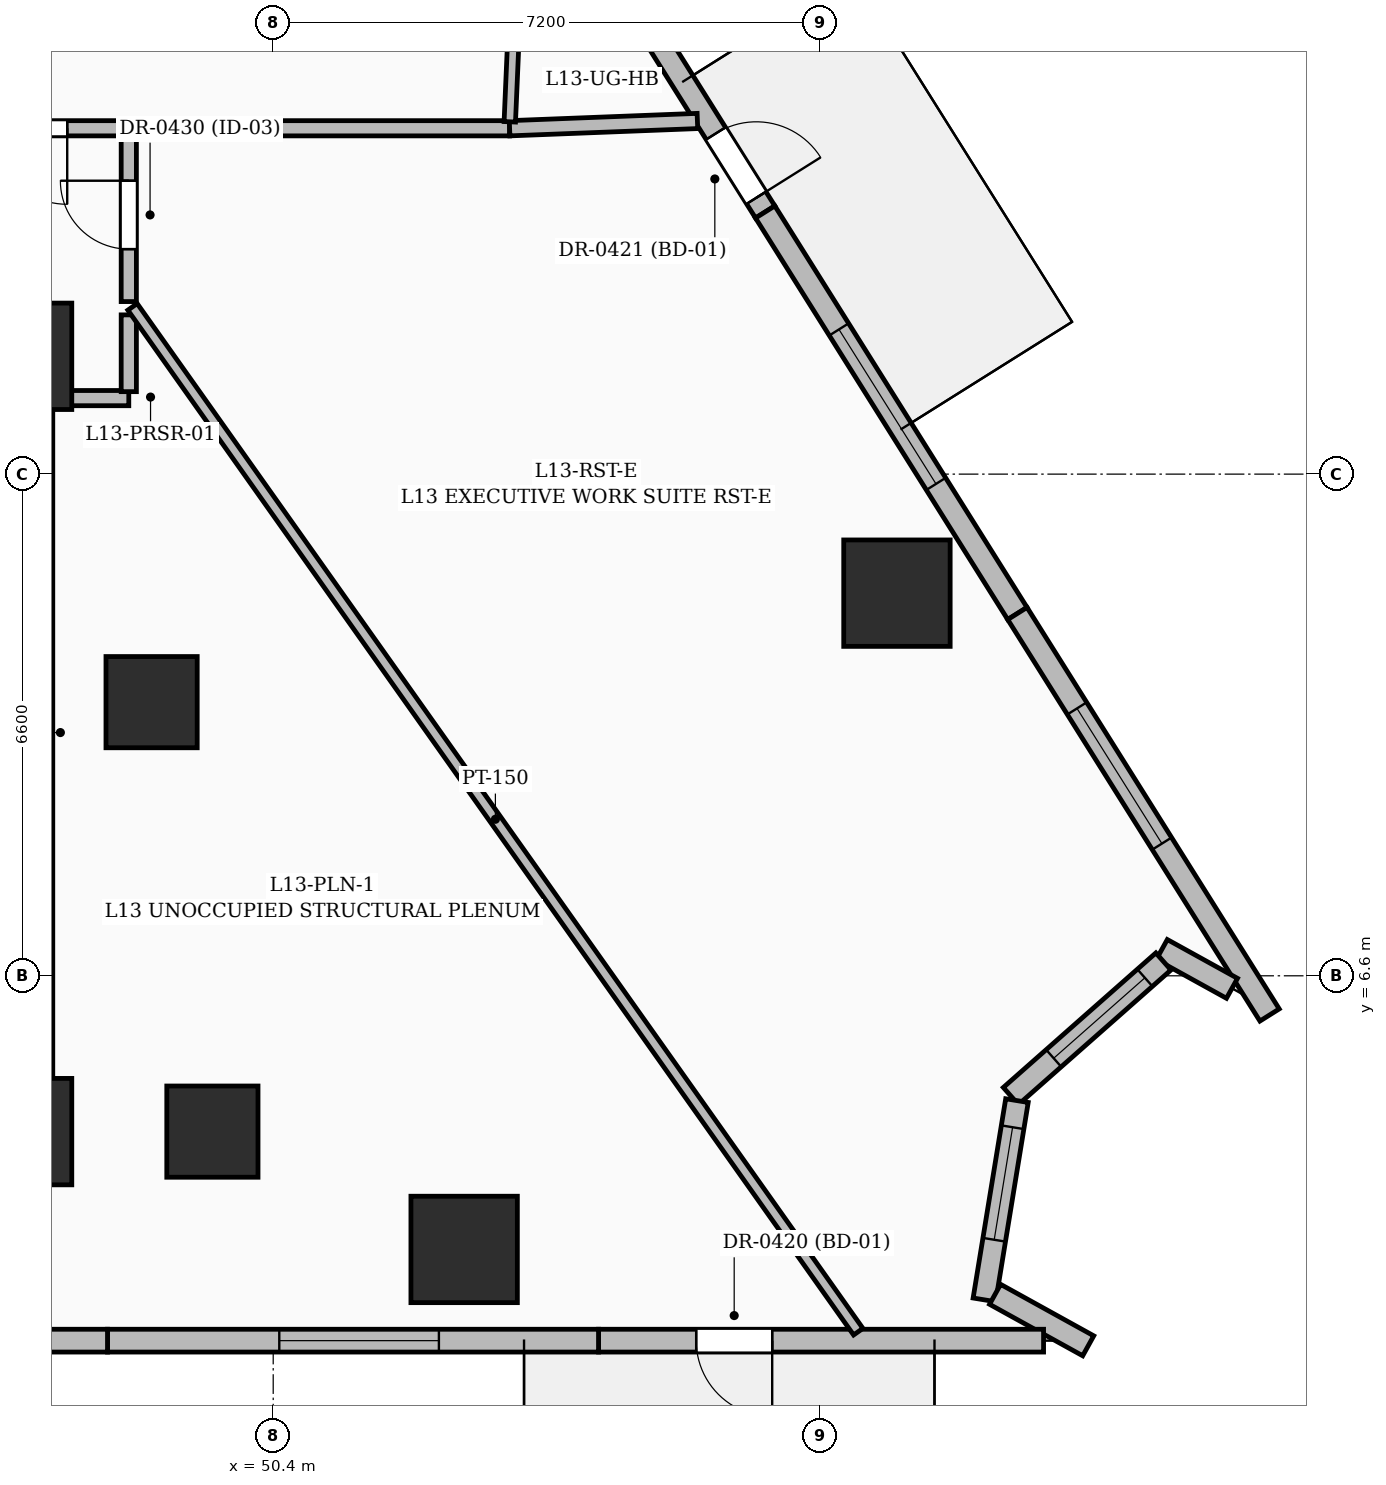
"""IFC4 building model, lengths in metres.
Left out: names, types, materials, properties, quantities, classifications, styles, units other than length and angle.
Written with IfcOpenShell. Run it as: python <this file> out.ifc"""

import sys

from ifc_helpers import new_model, si_unit, direction, frame, frame_2d, origin, origin_2d, place, context, subcontext, project, spatial, rectangle, extrude, element, fill, save


model = new_model("IFC4")
c1 = context("Model", 3, precision=1e-05, world=origin(), true_north=direction((0.0, 1.0)))
c2 = subcontext(c1, "Body", "Model", "MODEL_VIEW")
j1 = project(units=[si_unit("LENGTHUNIT", "METRE"), si_unit("PLANEANGLEUNIT", "RADIAN")], contexts=[c1])
p1 = place(None, origin())
s1 = spatial("IfcSite", under=j1, at=p1, CompositionType="ELEMENT")
p2 = place(p1, origin())
s2 = spatial("IfcBuilding", under=s1, at=p2, CompositionType="ELEMENT")
p3 = place(p2, frame((0.0, 0.0, 57.0)))
s3 = spatial("IfcBuildingStorey", under=s2, at=p3, CompositionType="ELEMENT", Elevation=57.0)
for number, where, z_axis, x_axis in (
    (1, (47.05, 4.55, 0.0), (0.0, 0.0, 1.0), (1.0, 0.0, 0.0)),
    (2, (47.05, 14.75, 0.0), (0.0, 0.0, 1.0), (1.0, 0.0, 0.0)),
):
    element("IfcColumn", number, at=place(p3, frame(where, z_axis=z_axis, x_axis=x_axis)), inside=s3, PredefinedType="COLUMN", context=c2, shape_type="SweptSolid", body=[
        extrude(rectangle(XDim=1.4, YDim=1.4, at=origin_2d()), origin(), (0.0, 0.0, 1.0), 3.6),
    ])
for number, where, z_axis, x_axis in (
    (3, (49.6, 4.55, 0.0), (0.0, 0.0, 1.0), (1.0, 0.0, 0.0)),
    (4, (48.8, 10.2, 0.0), (0.0, 0.0, 1.0), (1.0, 0.0, 0.0)),
):
    element("IfcColumn", number, at=place(p3, frame(where, z_axis=z_axis, x_axis=x_axis)), inside=s3, PredefinedType="COLUMN", context=c2, shape_type="SweptSolid", body=[
        extrude(rectangle(XDim=1.2, YDim=1.2, at=origin_2d()), origin(), (0.0, 0.0, 1.0), 3.6),
    ])
for number, where, z_axis, x_axis in (
    (5, (52.912, 3.0, 0.0), (0.0, 0.0, 1.0), (1.0, 0.0, 0.0)),
    (6, (58.606, 11.634, 0.0), (0.0, 0.0, 1.0), (1.0, 0.0, 0.0)),
):
    element("IfcColumn", number, at=place(p3, frame(where, z_axis=z_axis, x_axis=x_axis)), inside=s3, PredefinedType="COLUMN", context=c2, shape_type="SweptSolid", body=[
        extrude(rectangle(XDim=1.4, YDim=1.4, at=origin_2d()), origin(), (0.0, 0.0, 1.0), 3.6),
    ])
p4 = place(p3, frame((53.616, 21.834, 0.0), z_axis=(0.0, 0.0, 1.0), x_axis=(0.531897146978, -0.846808966082, 0.0)))
e7 = element("IfcWall", 7, at=p4, inside=s3, PredefinedType="SOLIDWALL", context=c2, shape_type="SweptSolid", body=[
    extrude(rectangle(XDim=6.123, YDim=0.3, at=frame_2d((3.062, 0.0))), origin(), (0.0, 0.0, 1.0), 3.35),
])
p5 = place(p4, frame((4.903, 0.0, 0.0)))
e8 = element("IfcOpeningElement", 8, at=p5, cuts=e7, PredefinedType="OPENING", context=c2, shape_type="SweptSolid", body=[
    extrude(rectangle(XDim=1.0, YDim=2.2, at=frame_2d((0.5, 1.1))), frame((0.0, 0.16, 0.0), z_axis=(0.0, -1.0, 0.0), x_axis=(1.0, 0.0, 0.0)), (0.0, 0.0, 1.0), 0.32),
])
p6 = place(p3, frame((56.873, 16.649, 0.0), z_axis=(0.0, 0.0, 1.0), x_axis=(0.531897384848, -0.846808816671, 0.0)))
e9 = element("IfcWall", 9, at=p6, inside=s3, PredefinedType="SOLIDWALL", context=c2, shape_type="SweptSolid", body=[
    extrude(rectangle(XDim=6.238, YDim=0.3, at=frame_2d((3.119, 0.0))), origin(), (0.0, 0.0, 1.0), 3.35),
])
p7 = place(p6, frame((1.825, 0.0, 0.6)))
e10 = element("IfcOpeningElement", 10, at=p7, cuts=e9, PredefinedType="OPENING", context=c2, shape_type="SweptSolid", body=[
    extrude(rectangle(XDim=2.4, YDim=2.1, at=frame_2d((1.2, 1.05))), frame((0.0, 0.16, 0.0), z_axis=(0.0, -1.0, 0.0), x_axis=(1.0, 0.0, 0.0)), (0.0, 0.0, 1.0), 0.32),
])
p8 = place(p3, frame((60.19, 11.367, 0.0), z_axis=(0.0, 0.0, 1.0), x_axis=(0.531925449882, -0.846791187819, 0.0)))
e11 = element("IfcWall", 11, at=p8, inside=s3, PredefinedType="SOLIDWALL", context=c2, shape_type="SweptSolid", body=[
    extrude(rectangle(XDim=6.238, YDim=0.3, at=frame_2d((3.119, 0.0))), origin(), (0.0, 0.0, 1.0), 3.35),
])
p9 = place(p8, frame((1.475, 0.0, 0.55)))
e12 = element("IfcOpeningElement", 12, at=p9, cuts=e11, PredefinedType="OPENING", context=c2, shape_type="SweptSolid", body=[
    extrude(rectangle(XDim=2.1, YDim=2.4, at=frame_2d((1.05, 1.2))), frame((0.0, 0.16, 0.0), z_axis=(0.0, -1.0, 0.0), x_axis=(1.0, 0.0, 0.0)), (0.0, 0.0, 1.0), 0.32),
])
p10 = place(p3, frame((63.014, 6.435, 0.0), z_axis=(0.0, 0.0, 1.0), x_axis=(-0.875148714457, 0.483854035412, 0.0)))
e13 = element("IfcWall", 13, at=p10, inside=s3, PredefinedType="SOLIDWALL", context=c2, shape_type="SweptSolid", body=[
    extrude(rectangle(XDim=1.055, YDim=0.3, at=frame_2d((0.528, 0.0))), origin(), (0.0, 0.0, 1.0), 3.35),
])
p11 = place(p3, frame((62.112, 6.789, 0.0), z_axis=(0.0, 0.0, 1.0), x_axis=(-0.749880449764, -0.661573360303, 0.0)))
e14 = element("IfcWall", 14, at=p11, inside=s3, PredefinedType="SOLIDWALL", context=c2, shape_type="SweptSolid", body=[
    extrude(rectangle(XDim=2.676, YDim=0.3, at=frame_2d((1.338, 0.0))), origin(), (0.0, 0.0, 1.0), 3.35),
])
p12 = place(p11, frame((0.325, 0.0, 0.55)))
e15 = element("IfcOpeningElement", 15, at=p12, cuts=e14, PredefinedType="OPENING", context=c2, shape_type="SweptSolid", body=[
    extrude(rectangle(XDim=1.6, YDim=2.2, at=frame_2d((0.8, 1.1))), frame((0.0, 0.16, 0.0), z_axis=(0.0, -1.0, 0.0), x_axis=(1.0, 0.0, 0.0)), (0.0, 0.0, 1.0), 0.32),
])
p13 = place(p3, frame((60.185, 4.958, 0.0), z_axis=(0.0, 0.0, 1.0), x_axis=(-0.16141694699, -0.986886300049, 0.0)))
e16 = element("IfcWall", 16, at=p13, inside=s3, PredefinedType="SOLIDWALL", context=c2, shape_type="SweptSolid", body=[
    extrude(rectangle(XDim=2.656, YDim=0.3, at=frame_2d((1.328, 0.0))), origin(), (0.0, 0.0, 1.0), 3.35),
])
p14 = place(p13, frame((0.355, 0.0, 0.6)))
e17 = element("IfcOpeningElement", 17, at=p14, cuts=e16, PredefinedType="OPENING", context=c2, shape_type="SweptSolid", body=[
    extrude(rectangle(XDim=1.5, YDim=2.1, at=frame_2d((0.75, 1.05))), frame((0.0, 0.16, 0.0), z_axis=(0.0, -1.0, 0.0), x_axis=(1.0, 0.0, 0.0)), (0.0, 0.0, 1.0), 0.32),
])
p15 = place(p3, frame((59.897, 2.41, 0.0), z_axis=(0.0, 0.0, 1.0), x_axis=(0.875216279123, -0.483731810777, 0.0)))
e18 = element("IfcWall", 18, at=p15, inside=s3, PredefinedType="SOLIDWALL", context=c2, shape_type="SweptSolid", body=[
    extrude(rectangle(XDim=1.4, YDim=0.3, at=frame_2d((0.7, 0.0))), origin(), (0.0, 0.0, 1.0), 3.35),
])
p16 = place(p3, frame((60.535, 1.8, 0.0), z_axis=(0.0, 0.0, 1.0), x_axis=(-1.0, 0.0, 0.0)))
e19 = element("IfcWall", 19, at=p16, inside=s3, PredefinedType="SOLIDWALL", context=c2, shape_type="SweptSolid", body=[
    extrude(rectangle(XDim=5.855, YDim=0.3, at=frame_2d((2.927, 0.0))), origin(), (0.0, 0.0, 1.0), 3.35),
])
p17 = place(p16, frame((3.57, 0.0, 0.0)))
e20 = element("IfcOpeningElement", 20, at=p17, cuts=e19, PredefinedType="OPENING", context=c2, shape_type="SweptSolid", body=[
    extrude(rectangle(XDim=1.0, YDim=2.2, at=frame_2d((0.5, 1.1))), frame((0.0, 0.16, 0.0), z_axis=(0.0, -1.0, 0.0), x_axis=(1.0, 0.0, 0.0)), (0.0, 0.0, 1.0), 0.32),
])
p18 = place(p3, frame((54.68, 1.8, 0.0), z_axis=(0.0, 0.0, 1.0), x_axis=(-1.0, 0.0, 0.0)))
e21 = element("IfcWall", 21, at=p18, inside=s3, PredefinedType="SOLIDWALL", context=c2, shape_type="SweptSolid", body=[
    extrude(rectangle(XDim=6.46, YDim=0.3, at=frame_2d((3.23, 0.0))), origin(), (0.0, 0.0, 1.0), 3.35),
])
p19 = place(p18, frame((2.1, 0.0, 0.55)))
e22 = element("IfcOpeningElement", 22, at=p19, cuts=e21, PredefinedType="OPENING", context=c2, shape_type="SweptSolid", body=[
    extrude(rectangle(XDim=2.1, YDim=2.4, at=frame_2d((1.05, 1.2))), frame((0.0, 0.16, 0.0), z_axis=(0.0, -1.0, 0.0), x_axis=(1.0, 0.0, 0.0)), (0.0, 0.0, 1.0), 0.32),
])
p20 = place(p3, frame((48.22, 1.8, 0.0), z_axis=(0.0, 0.0, 1.0), x_axis=(-1.0, 0.0, 0.0)))
e23 = element("IfcWall", 23, at=p20, inside=s3, PredefinedType="SOLIDWALL", context=c2, shape_type="SweptSolid", body=[
    extrude(rectangle(XDim=6.46, YDim=0.3, at=frame_2d((3.23, 0.0))), origin(), (0.0, 0.0, 1.0), 3.35),
])
p21 = place(p20, frame((2.25, 0.0, 0.6)))
e24 = element("IfcOpeningElement", 24, at=p21, cuts=e23, PredefinedType="OPENING", context=c2, shape_type="SweptSolid", body=[
    extrude(rectangle(XDim=1.8, YDim=2.1, at=frame_2d((0.9, 1.05))), frame((0.0, 0.16, 0.0), z_axis=(0.0, -1.0, 0.0), x_axis=(1.0, 0.0, 0.0)), (0.0, 0.0, 1.0), 0.32),
])
p22 = place(p3, frame((47.5, 14.2, 0.0), z_axis=(0.0, 0.0, 1.0), x_axis=(1.0, 0.0, 0.0)))
e25 = element("IfcWall", 25, at=p22, inside=s3, PredefinedType="PARTITIONING", context=c2, shape_type="SweptSolid", body=[
    extrude(rectangle(XDim=1.0, YDim=0.2, at=frame_2d((0.5, 0.0))), origin(), (0.0, 0.0, 1.0), 3.35),
])
p23 = place(p3, frame((48.5, 14.285, 0.0), z_axis=(0.0, 0.0, 1.0), x_axis=(0.0, 1.0, 0.0)))
e26 = element("IfcWall", 26, at=p23, inside=s3, PredefinedType="PARTITIONING", context=c2, shape_type="SweptSolid", body=[
    extrude(rectangle(XDim=1.01, YDim=0.2, at=frame_2d((0.505, 0.0))), origin(), (0.0, 0.0, 1.0), 3.35),
])
p24 = place(p3, frame((48.5, 15.47, 0.0), z_axis=(0.0, 0.0, 1.0), x_axis=(0.0, 1.0, 0.0)))
e27 = element("IfcWall", 27, at=p24, inside=s3, PredefinedType="PARTITIONING", context=c2, shape_type="SweptSolid", body=[
    extrude(rectangle(XDim=2.28, YDim=0.2, at=frame_2d((1.14, 0.0))), origin(), (0.0, 0.0, 1.0), 2.279),
])
p25 = place(p24, frame((0.69, 0.0, 0.0)))
e28 = element("IfcOpeningElement", 28, at=p25, cuts=e27, PredefinedType="OPENING", context=c2, shape_type="SweptSolid", body=[
    extrude(rectangle(XDim=0.9, YDim=2.1, at=frame_2d((0.45, 1.05))), frame((0.0, 0.11, 0.0), z_axis=(0.0, -1.0, 0.0), x_axis=(1.0, 0.0, 0.0)), (0.0, 0.0, 1.0), 0.22),
])
p26 = place(p3, frame((48.415, 17.75, 0.0), z_axis=(0.0, 0.0, 1.0), x_axis=(-1.0, 0.0, 0.0)))
e29 = element("IfcWall", 29, at=p26, inside=s3, PredefinedType="PARTITIONING", context=c2, shape_type="SweptSolid", body=[
    extrude(rectangle(XDim=2.535, YDim=0.2, at=frame_2d((1.268, 0.0))), origin(), (0.0, 0.0, 1.0), 2.309),
])
p27 = place(p26, frame((0.725, 0.0, 0.0)))
e30 = element("IfcOpeningElement", 30, at=p27, cuts=e29, PredefinedType="OPENING", context=c2, shape_type="SweptSolid", body=[
    extrude(rectangle(XDim=1.0, YDim=2.2, at=frame_2d((0.5, 1.1))), frame((0.0, 0.11, 0.0), z_axis=(0.0, -1.0, 0.0), x_axis=(1.0, 0.0, 0.0)), (0.0, 0.0, 1.0), 0.22),
])
p28 = place(p3, frame((58.097, 1.918, 0.0), z_axis=(0.0, 0.0, 1.0), x_axis=(-0.577911961482, 0.816099114554, 0.0)))
e31 = element("IfcWall", 31, at=p28, inside=s3, PredefinedType="PARTITIONING", context=c2, shape_type="SweptSolid", body=[
    extrude(rectangle(XDim=16.521, YDim=0.15, at=frame_2d((8.26, 0.0))), origin(), (0.0, 0.0, 1.0), 2.279),
])
p29 = place(p3, frame((53.51, 17.75, 0.0), z_axis=(0.0, 0.0, 1.0), x_axis=(-1.0, 0.0, 0.0)))
e32 = element("IfcWall", 32, at=p29, inside=s3, PredefinedType="PARTITIONING", context=c2, shape_type="SweptSolid", body=[
    extrude(rectangle(XDim=4.925, YDim=0.2, at=frame_2d((2.462, 0.0))), origin(), (0.0, 0.0, 1.0), 2.279),
])
p30 = place(p3, frame((55.981, 17.846, 0.0), z_axis=(0.0, 0.0, 1.0), x_axis=(-0.999246960983, -0.038800914501, 0.0)))
e33 = element("IfcWall", 33, at=p30, inside=s3, PredefinedType="PARTITIONING", context=c2, shape_type="SweptSolid", body=[
    extrude(rectangle(XDim=2.473, YDim=0.2, at=frame_2d((1.236, 0.0))), origin(), (0.0, 0.0, 1.0), 2.37),
])
p31 = place(p3, frame((53.513, 17.835, 0.0), z_axis=(0.0, 0.0, 1.0), x_axis=(0.043187524183, 0.999066983618, 0.0)))
e34 = element("IfcWall", 34, at=p31, inside=s3, PredefinedType="PARTITIONING", context=c2, shape_type="SweptSolid", body=[
    extrude(rectangle(XDim=3.691, YDim=0.15, at=frame_2d((1.846, 0.0))), origin(), (0.0, 0.0, 1.0), 2.37),
])
p32 = place(p31, frame((1.461, 0.0, 0.0)))
e35 = element("IfcOpeningElement", 35, at=p32, cuts=e34, PredefinedType="OPENING", context=c2, shape_type="SweptSolid", body=[
    extrude(rectangle(XDim=0.85, YDim=2.1, at=frame_2d((0.425, 1.05))), frame((0.0, 0.085, 0.0), z_axis=(0.0, -1.0, 0.0), x_axis=(1.0, 0.0, 0.0)), (0.0, 0.0, 1.0), 0.17),
])
p33 = place(p5, origin())
e36 = element("IfcDoor", 36, at=p33, inside=s3, OperationType="SINGLE_SWING_RIGHT", PredefinedType="DOOR", context=c2, shape_type="SweptSolid", body=[
    extrude(rectangle(XDim=1.0, YDim=2.2, at=frame_2d((0.5, 1.1))), frame((0.0, 0.025, 0.0), z_axis=(0.0, -1.0, 0.0), x_axis=(1.0, 0.0, 0.0)), (0.0, 0.0, 1.0), 0.05),
])
fill(e8, e36)
p34 = place(p7, origin())
e37 = element("IfcWindow", 37, at=p34, inside=s3, PartitioningType="SINGLE_PANEL", PredefinedType="WINDOW", context=c2, shape_type="SweptSolid", body=[
    extrude(rectangle(XDim=2.4, YDim=2.1, at=frame_2d((1.2, 1.05))), frame((0.0, 0.03, 0.0), z_axis=(0.0, -1.0, 0.0), x_axis=(1.0, 0.0, 0.0)), (0.0, 0.0, 1.0), 0.06),
])
fill(e10, e37)
p35 = place(p9, origin())
e38 = element("IfcWindow", 38, at=p35, inside=s3, PartitioningType="SINGLE_PANEL", PredefinedType="WINDOW", context=c2, shape_type="SweptSolid", body=[
    extrude(rectangle(XDim=2.1, YDim=2.4, at=frame_2d((1.05, 1.2))), frame((0.0, 0.03, 0.0), z_axis=(0.0, -1.0, 0.0), x_axis=(1.0, 0.0, 0.0)), (0.0, 0.0, 1.0), 0.06),
])
fill(e12, e38)
p36 = place(p12, origin())
e39 = element("IfcWindow", 39, at=p36, inside=s3, PartitioningType="SINGLE_PANEL", PredefinedType="WINDOW", context=c2, shape_type="SweptSolid", body=[
    extrude(rectangle(XDim=1.6, YDim=2.2, at=frame_2d((0.8, 1.1))), frame((0.0, 0.03, 0.0), z_axis=(0.0, -1.0, 0.0), x_axis=(1.0, 0.0, 0.0)), (0.0, 0.0, 1.0), 0.06),
])
fill(e15, e39)
p37 = place(p14, origin())
e40 = element("IfcWindow", 40, at=p37, inside=s3, PartitioningType="SINGLE_PANEL", PredefinedType="WINDOW", context=c2, shape_type="SweptSolid", body=[
    extrude(rectangle(XDim=1.5, YDim=2.1, at=frame_2d((0.75, 1.05))), frame((0.0, 0.03, 0.0), z_axis=(0.0, -1.0, 0.0), x_axis=(1.0, 0.0, 0.0)), (0.0, 0.0, 1.0), 0.06),
])
fill(e17, e40)
p38 = place(p17, origin())
e41 = element("IfcDoor", 41, at=p38, inside=s3, OperationType="SINGLE_SWING_LEFT", PredefinedType="DOOR", context=c2, shape_type="SweptSolid", body=[
    extrude(rectangle(XDim=1.0, YDim=2.2, at=frame_2d((0.5, 1.1))), frame((0.0, 0.025, 0.0), z_axis=(0.0, -1.0, 0.0), x_axis=(1.0, 0.0, 0.0)), (0.0, 0.0, 1.0), 0.05),
])
fill(e20, e41)
p39 = place(p19, origin())
e42 = element("IfcWindow", 42, at=p39, inside=s3, PartitioningType="SINGLE_PANEL", PredefinedType="WINDOW", context=c2, shape_type="SweptSolid", body=[
    extrude(rectangle(XDim=2.1, YDim=2.4, at=frame_2d((1.05, 1.2))), frame((0.0, 0.03, 0.0), z_axis=(0.0, -1.0, 0.0), x_axis=(1.0, 0.0, 0.0)), (0.0, 0.0, 1.0), 0.06),
])
fill(e22, e42)
p40 = place(p25, origin())
e43 = element("IfcDoor", 43, at=p40, inside=s3, OperationType="SINGLE_SWING_RIGHT", PredefinedType="DOOR", context=c2, shape_type="SweptSolid", body=[
    extrude(rectangle(XDim=0.9, YDim=2.1, at=frame_2d((0.45, 1.05))), frame((0.0, 0.025, 0.0), z_axis=(0.0, -1.0, 0.0), x_axis=(1.0, 0.0, 0.0)), (0.0, 0.0, 1.0), 0.05),
])
fill(e28, e43)
p41 = place(p27, origin())
e44 = element("IfcDoor", 44, at=p41, inside=s3, OperationType="SINGLE_SWING_LEFT", PredefinedType="DOOR", context=c2, shape_type="SweptSolid", body=[
    extrude(rectangle(XDim=1.0, YDim=2.2, at=frame_2d((0.5, 1.1))), frame((0.0, 0.025, 0.0), z_axis=(0.0, -1.0, 0.0), x_axis=(1.0, 0.0, 0.0)), (0.0, 0.0, 1.0), 0.05),
])
fill(e30, e44)
save(model, sys.argv[1])
